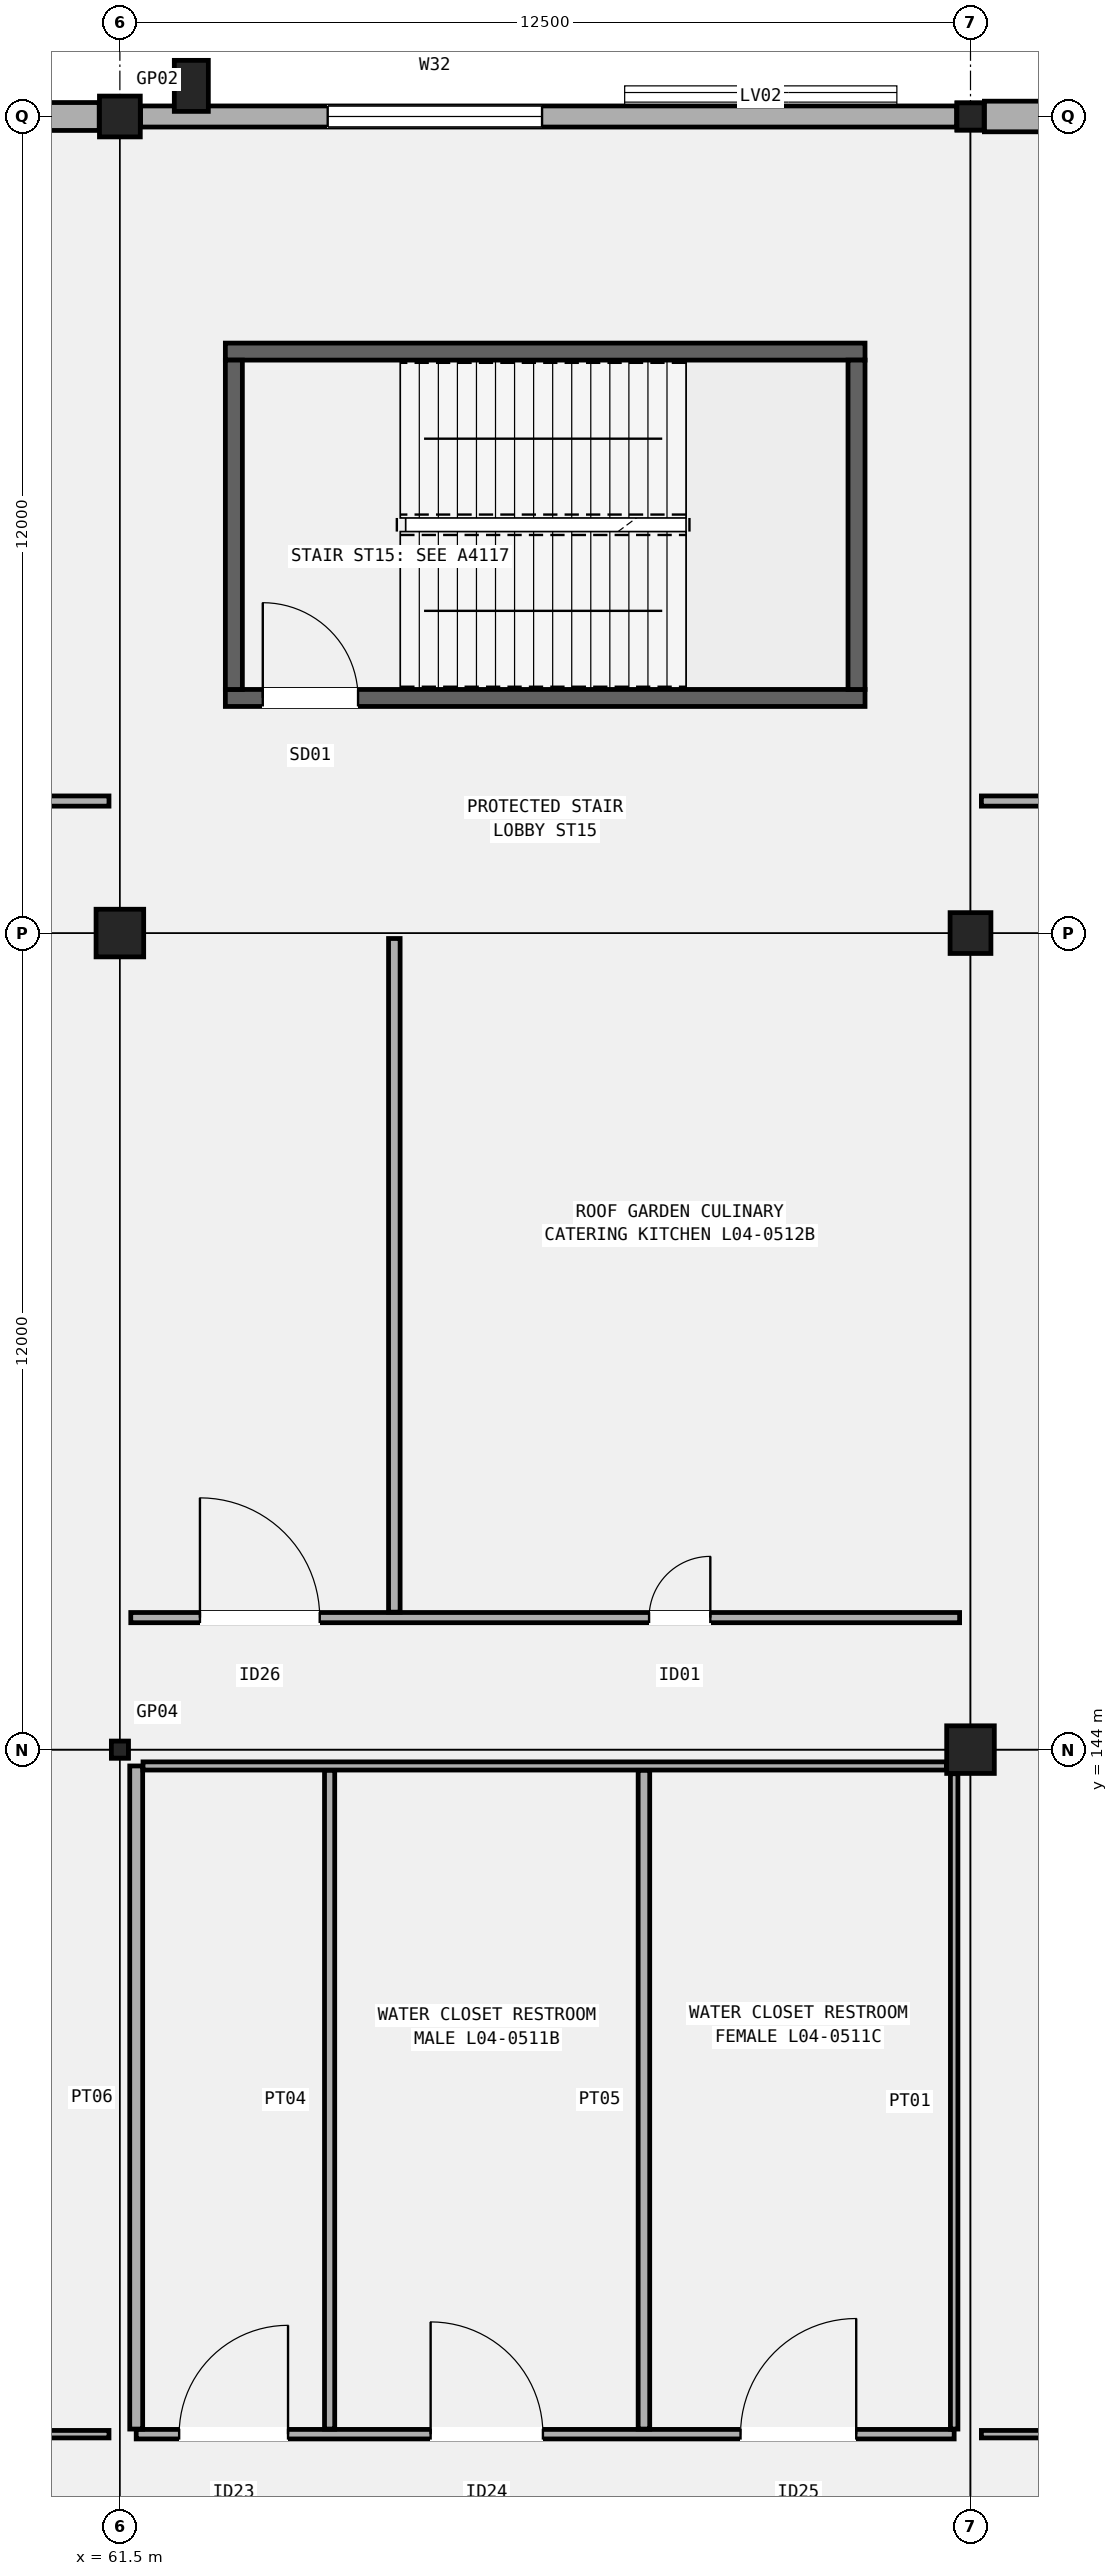
"""IFC4 building model, lengths in metres.
Left out: names, types, materials, properties, quantities, classifications, styles, units other than length and angle.
Written with IfcOpenShell. Run it as: python <this file> out.ifc"""

import sys

from ifc_helpers import new_model, si_unit, direction, frame, frame_2d, origin, origin_2d, place, context, subcontext, project, spatial, rectangle, hollow_rectangle, extrude, element, fill, save


model = new_model("IFC4")
c1 = context("Model", 3, precision=1e-05, world=origin(), true_north=direction((0.0, 1.0)))
c2 = subcontext(c1, "Body", "Model", "MODEL_VIEW")
j1 = project(units=[si_unit("LENGTHUNIT", "METRE"), si_unit("PLANEANGLEUNIT", "RADIAN")], contexts=[c1])
p1 = place(None, origin())
s1 = spatial("IfcSite", under=j1, at=p1, CompositionType="ELEMENT")
p2 = place(p1, origin())
s2 = spatial("IfcBuilding", under=s1, at=p2, CompositionType="ELEMENT")
p3 = place(p2, frame((0.0, 0.0, 20.4)))
s3 = spatial("IfcBuildingStorey", under=s2, at=p3, CompositionType="ELEMENT", Elevation=20.4)
p4 = place(p3, frame((61.5, 144.0, 0.0), z_axis=(0.0, 0.0, 1.0), x_axis=(1.0, 0.0, 0.0)))
e1 = element("IfcColumn", 1, at=p4, inside=s3, PredefinedType="COLUMN", context=c2, shape_type="SweptSolid", body=[
    extrude(hollow_rectangle(XDim=0.25, YDim=0.25, WallThickness=0.012, InnerFilletRadius=0.012, OuterFilletRadius=0.024, at=origin_2d()), origin(), (0.0, 0.0, 1.0), 5.4),
])
p5 = place(p3, frame((61.5, 156.0, 0.0), z_axis=(0.0, 0.0, 1.0), x_axis=(1.0, 0.0, 0.0)))
e2 = element("IfcColumn", 2, at=p5, inside=s3, PredefinedType="COLUMN", context=c2, shape_type="SweptSolid", body=[
    extrude(rectangle(XDim=0.7, YDim=0.7, at=origin_2d()), origin(), (0.0, 0.0, 1.0), 5.4),
])
p6 = place(p3, frame((61.5, 168.0, 0.0), z_axis=(0.0, 0.0, 1.0), x_axis=(1.0, 0.0, 0.0)))
e3 = element("IfcColumn", 3, at=p6, inside=s3, PredefinedType="COLUMN", context=c2, shape_type="SweptSolid", body=[
    extrude(rectangle(XDim=0.6, YDim=0.6, at=origin_2d()), origin(), (0.0, 0.0, 1.0), 5.4),
])
p7 = place(p3, frame((74.0, 144.0, 0.0), z_axis=(0.0, 0.0, 1.0), x_axis=(1.0, 0.0, 0.0)))
e4 = element("IfcColumn", 4, at=p7, inside=s3, PredefinedType="COLUMN", context=c2, shape_type="SweptSolid", body=[
    extrude(rectangle(XDim=0.7, YDim=0.7, at=origin_2d()), origin(), (0.0, 0.0, 1.0), 5.4),
])
p8 = place(p3, frame((74.0, 156.0, 0.0), z_axis=(0.0, 0.0, 1.0), x_axis=(1.0, 0.0, 0.0)))
e5 = element("IfcColumn", 5, at=p8, inside=s3, PredefinedType="COLUMN", context=c2, shape_type="SweptSolid", body=[
    extrude(rectangle(XDim=0.6, YDim=0.6, at=origin_2d()), origin(), (0.0, 0.0, 1.0), 5.4),
])
p9 = place(p3, frame((74.0, 168.0, 0.0), z_axis=(0.0, 0.0, 1.0), x_axis=(1.0, 0.0, 0.0)))
e6 = element("IfcColumn", 6, at=p9, inside=s3, PredefinedType="COLUMN", context=c2, shape_type="SweptSolid", body=[
    extrude(hollow_rectangle(XDim=0.4, YDim=0.4, WallThickness=0.016, InnerFilletRadius=0.016, OuterFilletRadius=0.032, at=origin_2d()), origin(), (0.0, 0.0, 1.0), 5.4),
])
p10 = place(p3, frame((62.55, 168.45, 0.0), z_axis=(0.0, 0.0, 1.0), x_axis=(1.0, 0.0, 0.0)))
e7 = element("IfcColumn", 7, at=p10, inside=s3, PredefinedType="PILASTER", context=c2, shape_type="SweptSolid", body=[
    extrude(rectangle(XDim=0.5, YDim=0.75, at=origin_2d()), origin(), (0.0, 0.0, 1.0), 5.4),
])
p11 = place(p3, frame((49.354, 168.0, 0.0), z_axis=(0.0, 0.0, 1.0), x_axis=(1.0, 0.0, 0.0)))
e8 = element("IfcWall", 8, at=p11, inside=s3, PredefinedType="SOLIDWALL", context=c2, shape_type="SweptSolid", body=[
    extrude(rectangle(XDim=11.842, YDim=0.41, at=frame_2d((5.921, 0.0))), origin(), (0.0, 0.0, 1.0), 4.48),
])
p12 = place(p11, frame((1.5, 0.0, 0.95)))
e9 = element("IfcOpeningElement", 9, at=p12, cuts=e8, PredefinedType="OPENING", context=c2, shape_type="SweptSolid", body=[
    extrude(rectangle(XDim=2.85, YDim=2.0, at=frame_2d((1.425, 1.0))), frame((0.0, 0.215, 0.0), z_axis=(0.0, -1.0, 0.0), x_axis=(1.0, 0.0, 0.0)), (0.0, 0.0, 1.0), 0.43),
])
p13 = place(p3, frame((61.804, 168.0, 0.0), z_axis=(0.0, 0.0, 1.0), x_axis=(1.0, 0.0, 0.0)))
e10 = element("IfcWall", 10, at=p13, inside=s3, PredefinedType="SOLIDWALL", context=c2, shape_type="SweptSolid", body=[
    extrude(rectangle(XDim=11.992, YDim=0.31, at=frame_2d((5.996, 0.0))), origin(), (0.0, 0.0, 1.0), 4.58),
])
p14 = place(p13, frame((2.75, 0.0, 0.95)))
e11 = element("IfcOpeningElement", 11, at=p14, cuts=e10, PredefinedType="OPENING", context=c2, shape_type="SweptSolid", body=[
    extrude(rectangle(XDim=3.15, YDim=1.9, at=frame_2d((1.575, 0.95))), frame((0.0, 0.165, 0.0), z_axis=(0.0, -1.0, 0.0), x_axis=(1.0, 0.0, 0.0)), (0.0, 0.0, 1.0), 0.33),
])
p15 = place(p3, frame((74.204, 168.0, 0.0), z_axis=(0.0, 0.0, 1.0), x_axis=(1.0, 0.0, 0.0)))
e12 = element("IfcWall", 12, at=p15, inside=s3, PredefinedType="SOLIDWALL", context=c2, shape_type="SweptSolid", body=[
    extrude(rectangle(XDim=12.117, YDim=0.45, at=frame_2d((6.059, 0.0))), origin(), (0.0, 0.0, 1.0), 4.592),
])
p16 = place(p15, frame((1.5, 0.0, 0.95)))
e13 = element("IfcOpeningElement", 13, at=p16, cuts=e12, PredefinedType="OPENING", context=c2, shape_type="SweptSolid", body=[
    extrude(rectangle(XDim=3.3, YDim=2.25, at=frame_2d((1.65, 1.125))), frame((0.0, 0.235, 0.0), z_axis=(0.0, -1.0, 0.0), x_axis=(1.0, 0.0, 0.0)), (0.0, 0.0, 1.0), 0.47),
])
p17 = place(p3, frame((63.05, 159.455, 0.0), z_axis=(0.0, 0.0, 1.0), x_axis=(1.0, 0.0, 0.0)))
e14 = element("IfcWall", 14, at=p17, inside=s3, PredefinedType="SHEAR", context=c2, shape_type="SweptSolid", body=[
    extrude(rectangle(XDim=9.4, YDim=0.25, at=frame_2d((4.7, 0.0))), origin(), (0.0, 0.0, 1.0), 5.18),
])
p18 = place(p17, frame((0.55, 0.0, 0.0)))
e15 = element("IfcOpeningElement", 15, at=p18, cuts=e14, PredefinedType="OPENING", context=c2, shape_type="SweptSolid", body=[
    extrude(rectangle(XDim=1.4, YDim=2.15, at=frame_2d((0.7, 1.075))), frame((0.0, 0.135, 0.0), z_axis=(0.0, -1.0, 0.0), x_axis=(1.0, 0.0, 0.0)), (0.0, 0.0, 1.0), 0.27),
])
p19 = place(p3, frame((63.05, 164.545, 0.0), z_axis=(0.0, 0.0, 1.0), x_axis=(1.0, 0.0, 0.0)))
e16 = element("IfcWall", 16, at=p19, inside=s3, PredefinedType="SHEAR", context=c2, shape_type="SweptSolid", body=[
    extrude(rectangle(XDim=9.4, YDim=0.25, at=frame_2d((4.7, 0.0))), origin(), (0.0, 0.0, 1.0), 5.18),
])
for number, where, z_axis, x_axis in (
    (17, (63.175, 159.58, 0.0), (0.0, 0.0, 1.0), (0.0, 1.0, 0.0)),
    (18, (72.325, 159.58, 0.0), (0.0, 0.0, 1.0), (0.0, 1.0, 0.0)),
):
    element("IfcWall", number, at=place(p3, frame(where, z_axis=z_axis, x_axis=x_axis)), inside=s3, PredefinedType="SHEAR", context=c2, shape_type="SweptSolid", body=[
        extrude(rectangle(XDim=4.84, YDim=0.25, at=frame_2d((2.42, 0.0))), origin(), (0.0, 0.0, 1.0), 5.18),
    ])
p20 = place(p3, frame((49.142, 133.94, 0.0), z_axis=(0.0, 0.0, 1.0), x_axis=(1.0, 0.0, 0.0)))
e19 = element("IfcWall", 19, at=p20, inside=s3, PredefinedType="PARTITIONING", context=c2, shape_type="SweptSolid", body=[
    extrude(rectangle(XDim=12.198, YDim=0.11, at=frame_2d((6.099, 0.0))), origin(), (0.0, 0.0, 1.0), 4.52),
])
p21 = place(p20, frame((2.039, 0.0, 0.0)))
e20 = element("IfcOpeningElement", 20, at=p21, cuts=e19, PredefinedType="OPENING", context=c2, shape_type="SweptSolid", body=[
    extrude(rectangle(XDim=1.48, YDim=2.24, at=frame_2d((0.74, 1.12))), frame((0.0, 0.065, 0.0), z_axis=(0.0, -1.0, 0.0), x_axis=(1.0, 0.0, 0.0)), (0.0, 0.0, 1.0), 0.13),
])
p22 = place(p20, frame((8.189, 0.0, 0.0)))
e21 = element("IfcOpeningElement", 21, at=p22, cuts=e19, PredefinedType="OPENING", context=c2, shape_type="SweptSolid", body=[
    extrude(rectangle(XDim=1.52, YDim=2.28, at=frame_2d((0.76, 1.14))), frame((0.0, 0.065, 0.0), z_axis=(0.0, -1.0, 0.0), x_axis=(1.0, 0.0, 0.0)), (0.0, 0.0, 1.0), 0.13),
])
p23 = place(p3, frame((49.187, 157.94, 0.0), z_axis=(0.0, 0.0, 1.0), x_axis=(1.0, 0.0, 0.0)))
e22 = element("IfcWall", 22, at=p23, inside=s3, PredefinedType="PARTITIONING", context=c2, shape_type="SweptSolid", body=[
    extrude(rectangle(XDim=12.153, YDim=0.15, at=frame_2d((6.077, 0.0))), origin(), (0.0, 0.0, 1.0), 4.52),
])
p24 = place(p23, frame((5.283, 0.0, 0.0)))
e23 = element("IfcOpeningElement", 23, at=p24, cuts=e22, PredefinedType="OPENING", context=c2, shape_type="SweptSolid", body=[
    extrude(rectangle(XDim=1.56, YDim=2.26, at=frame_2d((0.78, 1.13))), frame((0.0, 0.085, 0.0), z_axis=(0.0, -1.0, 0.0), x_axis=(1.0, 0.0, 0.0)), (0.0, 0.0, 1.0), 0.17),
])
p25 = place(p3, frame((61.74, 133.94, 0.0), z_axis=(0.0, 0.0, 1.0), x_axis=(1.0, 0.0, 0.0)))
e24 = element("IfcWall", 24, at=p25, inside=s3, PredefinedType="PARTITIONING", context=c2, shape_type="SweptSolid", body=[
    extrude(rectangle(XDim=12.02, YDim=0.14, at=frame_2d((6.01, 0.0))), origin(), (0.0, 0.0, 1.0), 4.52),
])
p26 = place(p25, frame((0.631, 0.0, 0.0)))
e25 = element("IfcOpeningElement", 25, at=p26, cuts=e24, PredefinedType="OPENING", context=c2, shape_type="SweptSolid", body=[
    extrude(rectangle(XDim=1.6, YDim=2.3, at=frame_2d((0.8, 1.15))), frame((0.0, 0.08, 0.0), z_axis=(0.0, -1.0, 0.0), x_axis=(1.0, 0.0, 0.0)), (0.0, 0.0, 1.0), 0.16),
])
p27 = place(p25, frame((4.327, 0.0, 0.0)))
e26 = element("IfcOpeningElement", 26, at=p27, cuts=e24, PredefinedType="OPENING", context=c2, shape_type="SweptSolid", body=[
    extrude(rectangle(XDim=1.65, YDim=2.28, at=frame_2d((0.825, 1.14))), frame((0.0, 0.08, 0.0), z_axis=(0.0, -1.0, 0.0), x_axis=(1.0, 0.0, 0.0)), (0.0, 0.0, 1.0), 0.16),
])
p28 = place(p25, frame((8.881, 0.0, 0.0)))
e27 = element("IfcOpeningElement", 27, at=p28, cuts=e24, PredefinedType="OPENING", context=c2, shape_type="SweptSolid", body=[
    extrude(rectangle(XDim=1.7, YDim=2.32, at=frame_2d((0.85, 1.16))), frame((0.0, 0.08, 0.0), z_axis=(0.0, -1.0, 0.0), x_axis=(1.0, 0.0, 0.0)), (0.0, 0.0, 1.0), 0.16),
])
p29 = place(p3, frame((61.74, 134.015, 0.0), z_axis=(0.0, 0.0, 1.0), x_axis=(0.0, 1.0, 0.0)))
e28 = element("IfcWall", 28, at=p29, inside=s3, PredefinedType="PARTITIONING", context=c2, shape_type="SweptSolid", body=[
    extrude(rectangle(XDim=9.745, YDim=0.19, at=frame_2d((4.873, 0.0))), origin(), (0.0, 0.0, 1.0), 4.52),
])
p30 = place(p3, frame((73.76, 134.015, 0.0), z_axis=(0.0, 0.0, 1.0), x_axis=(0.0, 1.0, 0.0)))
e29 = element("IfcWall", 29, at=p30, inside=s3, PredefinedType="PARTITIONING", context=c2, shape_type="SweptSolid", body=[
    extrude(rectangle(XDim=9.631, YDim=0.11, at=frame_2d((4.815, 0.0))), origin(), (0.0, 0.0, 1.0), 4.52),
])
p31 = place(p3, frame((61.84, 143.76, 0.0), z_axis=(0.0, 0.0, 1.0), x_axis=(1.0, 0.0, 0.0)))
e30 = element("IfcWall", 30, at=p31, inside=s3, PredefinedType="PARTITIONING", context=c2, shape_type="SweptSolid", body=[
    extrude(rectangle(XDim=11.806, YDim=0.12, at=frame_2d((5.903, 0.0))), origin(), (0.0, 0.0, 1.0), 4.52),
])
p32 = place(p3, frame((64.582, 134.015, 0.0), z_axis=(0.0, 0.0, 1.0), x_axis=(0.0, 1.0, 0.0)))
e31 = element("IfcWall", 31, at=p32, inside=s3, PredefinedType="PARTITIONING", context=c2, shape_type="SweptSolid", body=[
    extrude(rectangle(XDim=9.68, YDim=0.15, at=frame_2d((4.84, 0.0))), origin(), (0.0, 0.0, 1.0), 4.52),
])
p33 = place(p3, frame((69.201, 134.015, 0.0), z_axis=(0.0, 0.0, 1.0), x_axis=(0.0, 1.0, 0.0)))
e32 = element("IfcWall", 32, at=p33, inside=s3, PredefinedType="PARTITIONING", context=c2, shape_type="SweptSolid", body=[
    extrude(rectangle(XDim=9.68, YDim=0.17, at=frame_2d((4.84, 0.0))), origin(), (0.0, 0.0, 1.0), 4.52),
])
p34 = place(p3, frame((61.66, 145.94, 0.0), z_axis=(0.0, 0.0, 1.0), x_axis=(1.0, 0.0, 0.0)))
e33 = element("IfcWall", 33, at=p34, inside=s3, PredefinedType="PARTITIONING", context=c2, shape_type="SweptSolid", body=[
    extrude(rectangle(XDim=12.18, YDim=0.15, at=frame_2d((6.09, 0.0))), origin(), (0.0, 0.0, 1.0), 4.52),
])
p35 = place(p34, frame((1.017, 0.0, 0.0)))
e34 = element("IfcOpeningElement", 34, at=p35, cuts=e33, PredefinedType="OPENING", context=c2, shape_type="SweptSolid", body=[
    extrude(rectangle(XDim=1.76, YDim=2.3, at=frame_2d((0.88, 1.15))), frame((0.0, 0.085, 0.0), z_axis=(0.0, -1.0, 0.0), x_axis=(1.0, 0.0, 0.0)), (0.0, 0.0, 1.0), 0.17),
])
p36 = place(p34, frame((7.617, 0.0, 0.0)))
e35 = element("IfcOpeningElement", 35, at=p36, cuts=e33, PredefinedType="OPENING", context=c2, shape_type="SweptSolid", body=[
    extrude(rectangle(XDim=0.9, YDim=2.06, at=frame_2d((0.45, 1.03))), frame((0.0, 0.085, 0.0), z_axis=(0.0, -1.0, 0.0), x_axis=(1.0, 0.0, 0.0)), (0.0, 0.0, 1.0), 0.17),
])
p37 = place(p3, frame((65.533, 146.02, 0.0), z_axis=(0.0, 0.0, 1.0), x_axis=(0.0, 1.0, 0.0)))
e36 = element("IfcWall", 36, at=p37, inside=s3, PredefinedType="PARTITIONING", context=c2, shape_type="SweptSolid", body=[
    extrude(rectangle(XDim=9.9, YDim=0.17, at=frame_2d((4.95, 0.0))), origin(), (0.0, 0.0, 1.0), 4.52),
])
p38 = place(p3, frame((74.16, 133.94, 0.0), z_axis=(0.0, 0.0, 1.0), x_axis=(1.0, 0.0, 0.0)))
e37 = element("IfcWall", 37, at=p38, inside=s3, PredefinedType="PARTITIONING", context=c2, shape_type="SweptSolid", body=[
    extrude(rectangle(XDim=12.18, YDim=0.11, at=frame_2d((6.09, 0.0))), origin(), (0.0, 0.0, 1.0), 4.52),
])
p39 = place(p38, frame((2.302, 0.0, 0.0)))
e38 = element("IfcOpeningElement", 38, at=p39, cuts=e37, PredefinedType="OPENING", context=c2, shape_type="SweptSolid", body=[
    extrude(rectangle(XDim=0.92, YDim=2.1, at=frame_2d((0.46, 1.05))), frame((0.0, 0.065, 0.0), z_axis=(0.0, -1.0, 0.0), x_axis=(1.0, 0.0, 0.0)), (0.0, 0.0, 1.0), 0.13),
])
p40 = place(p38, frame((8.456, 0.0, 0.0)))
e39 = element("IfcOpeningElement", 39, at=p40, cuts=e37, PredefinedType="OPENING", context=c2, shape_type="SweptSolid", body=[
    extrude(rectangle(XDim=0.95, YDim=2.12, at=frame_2d((0.475, 1.06))), frame((0.0, 0.065, 0.0), z_axis=(0.0, -1.0, 0.0), x_axis=(1.0, 0.0, 0.0)), (0.0, 0.0, 1.0), 0.13),
])
p41 = place(p3, frame((74.16, 157.94, 0.0), z_axis=(0.0, 0.0, 1.0), x_axis=(1.0, 0.0, 0.0)))
e40 = element("IfcWall", 40, at=p41, inside=s3, PredefinedType="PARTITIONING", context=c2, shape_type="SweptSolid", body=[
    extrude(rectangle(XDim=12.133, YDim=0.15, at=frame_2d((6.066, 0.0))), origin(), (0.0, 0.0, 1.0), 4.52),
])
p42 = place(p41, frame((5.6, 0.0, 0.0)))
e41 = element("IfcOpeningElement", 41, at=p42, cuts=e40, PredefinedType="OPENING", context=c2, shape_type="SweptSolid", body=[
    extrude(rectangle(XDim=0.98, YDim=2.1, at=frame_2d((0.49, 1.05))), frame((0.0, 0.085, 0.0), z_axis=(0.0, -1.0, 0.0), x_axis=(1.0, 0.0, 0.0)), (0.0, 0.0, 1.0), 0.17),
])
p43 = place(p14, origin())
e42 = element("IfcWindow", 42, at=p43, inside=s3, PartitioningType="SINGLE_PANEL", PredefinedType="WINDOW", context=c2, shape_type="SweptSolid", body=[
    extrude(rectangle(XDim=3.15, YDim=1.9, at=frame_2d((1.575, 0.95))), frame((0.0, 0.03, 0.0), z_axis=(0.0, -1.0, 0.0), x_axis=(1.0, 0.0, 0.0)), (0.0, 0.0, 1.0), 0.06),
])
fill(e11, e42)
p44 = place(p18, origin())
e43 = element("IfcDoor", 43, at=p44, inside=s3, OperationType="SINGLE_SWING_LEFT", PredefinedType="DOOR", context=c2, shape_type="SweptSolid", body=[
    extrude(rectangle(XDim=1.4, YDim=2.15, at=frame_2d((0.7, 1.075))), frame((0.0, 0.025, 0.0), z_axis=(0.0, -1.0, 0.0), x_axis=(1.0, 0.0, 0.0)), (0.0, 0.0, 1.0), 0.05),
])
fill(e15, e43)
p45 = place(p26, origin())
e44 = element("IfcDoor", 44, at=p45, inside=s3, OperationType="SINGLE_SWING_RIGHT", PredefinedType="DOOR", context=c2, shape_type="SweptSolid", body=[
    extrude(rectangle(XDim=1.6, YDim=2.3, at=frame_2d((0.8, 1.15))), frame((0.0, 0.025, 0.0), z_axis=(0.0, -1.0, 0.0), x_axis=(1.0, 0.0, 0.0)), (0.0, 0.0, 1.0), 0.05),
])
fill(e25, e44)
p46 = place(p27, origin())
e45 = element("IfcDoor", 45, at=p46, inside=s3, OperationType="SINGLE_SWING_LEFT", PredefinedType="DOOR", context=c2, shape_type="SweptSolid", body=[
    extrude(rectangle(XDim=1.65, YDim=2.28, at=frame_2d((0.825, 1.14))), frame((0.0, 0.025, 0.0), z_axis=(0.0, -1.0, 0.0), x_axis=(1.0, 0.0, 0.0)), (0.0, 0.0, 1.0), 0.05),
])
fill(e26, e45)
p47 = place(p28, origin())
e46 = element("IfcDoor", 46, at=p47, inside=s3, OperationType="SINGLE_SWING_RIGHT", PredefinedType="DOOR", context=c2, shape_type="SweptSolid", body=[
    extrude(rectangle(XDim=1.7, YDim=2.32, at=frame_2d((0.85, 1.16))), frame((0.0, 0.025, 0.0), z_axis=(0.0, -1.0, 0.0), x_axis=(1.0, 0.0, 0.0)), (0.0, 0.0, 1.0), 0.05),
])
fill(e27, e46)
p48 = place(p35, origin())
e47 = element("IfcDoor", 47, at=p48, inside=s3, OperationType="SINGLE_SWING_LEFT", PredefinedType="DOOR", context=c2, shape_type="SweptSolid", body=[
    extrude(rectangle(XDim=1.76, YDim=2.3, at=frame_2d((0.88, 1.15))), frame((0.0, 0.025, 0.0), z_axis=(0.0, -1.0, 0.0), x_axis=(1.0, 0.0, 0.0)), (0.0, 0.0, 1.0), 0.05),
])
fill(e34, e47)
p49 = place(p36, origin())
e48 = element("IfcDoor", 48, at=p49, inside=s3, OperationType="SINGLE_SWING_RIGHT", PredefinedType="DOOR", context=c2, shape_type="SweptSolid", body=[
    extrude(rectangle(XDim=0.9, YDim=2.06, at=frame_2d((0.45, 1.03))), frame((0.0, 0.025, 0.0), z_axis=(0.0, -1.0, 0.0), x_axis=(1.0, 0.0, 0.0)), (0.0, 0.0, 1.0), 0.05),
])
fill(e35, e48)
save(model, sys.argv[1])
